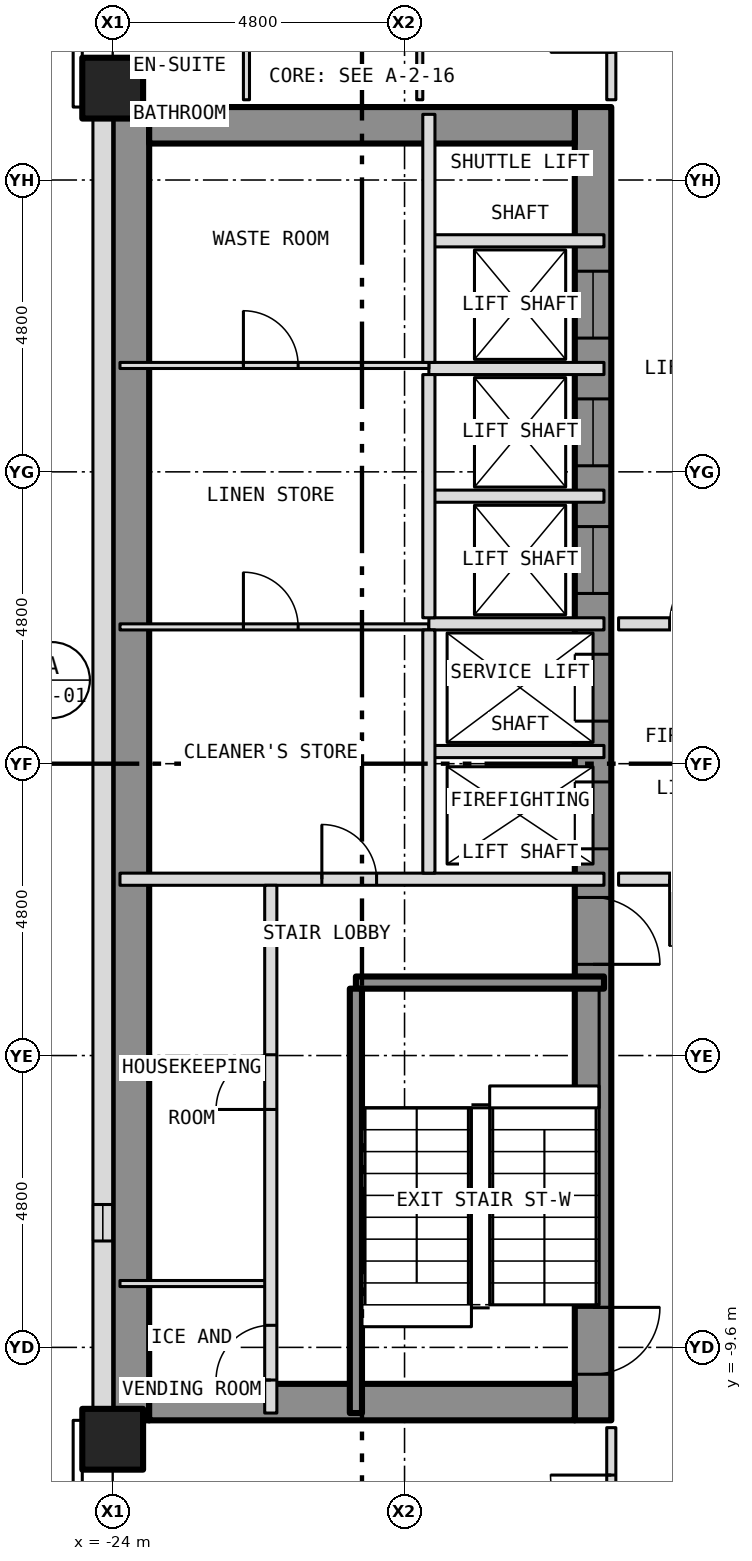
"""IFC4 building model, lengths in metres.
Left out: names, types, materials, properties, quantities, classifications, styles, units other than length and angle.
Written with IfcOpenShell. Run it as: python <this file> out.ifc"""

import sys

from ifc_helpers import new_model, si_unit, direction, frame, frame_2d, origin, origin_2d, place, context, subcontext, project, spatial, rectangle, hollow_rectangle, extrude, element, fill, save


model = new_model("IFC4")
c1 = context("Model", 3, precision=1e-05, world=origin(), true_north=direction((0.0, 1.0)))
c2 = subcontext(c1, "Body", "Model", "MODEL_VIEW")
j1 = project(units=[si_unit("LENGTHUNIT", "METRE"), si_unit("PLANEANGLEUNIT", "RADIAN")], contexts=[c1])
p1 = place(None, origin())
s1 = spatial("IfcSite", under=j1, at=p1, CompositionType="ELEMENT")
p2 = place(p1, origin())
s2 = spatial("IfcBuilding", under=s1, at=p2, CompositionType="ELEMENT")
p3 = place(p2, frame((0.0, 0.0, 60.0)))
s3 = spatial("IfcBuildingStorey", under=s2, at=p3, CompositionType="ELEMENT", Elevation=60.0)
for number, where, z_axis, x_axis in (
    (1, (-24.0, -11.111, -0.15), (0.0, 0.0, 1.0), (1.0, 0.0, 0.0)),
    (2, (-24.0, 11.111, -0.15), (0.0, 0.0, 1.0), (1.0, 0.0, 0.0)),
):
    element("IfcColumn", number, at=place(p3, frame(where, z_axis=z_axis, x_axis=x_axis)), inside=s3, PredefinedType="COLUMN", context=c2, shape_type="SweptSolid", body=[
        extrude(hollow_rectangle(XDim=1.0, YDim=1.0, WallThickness=0.06, at=origin_2d()), origin(), (0.0, 0.0, 1.0), 3.5),
    ])
p4 = place(p3, frame((-16.1, -10.8, 0.0), z_axis=(0.0, 0.0, 1.0), x_axis=(0.0, 1.0, 0.0)))
e3 = element("IfcWall", 3, at=p4, inside=s3, PredefinedType="SHEAR", context=c2, shape_type="SweptSolid", body=[
    extrude(rectangle(XDim=21.6, YDim=0.6, at=frame_2d((10.8, 0.0))), origin(), (0.0, 0.0, 1.0), 3.25),
])
p5 = place(p4, frame((9.4, 0.0, 0.0)))
e4 = element("IfcOpeningElement", 4, at=p5, cuts=e3, PredefinedType="OPENING", context=c2, shape_type="SweptSolid", body=[
    extrude(rectangle(XDim=1.1, YDim=2.1, at=frame_2d((0.55, 1.05))), frame((0.0, 0.312, 0.0), z_axis=(0.0, -1.0, 0.0), x_axis=(1.0, 0.0, 0.0)), (0.0, 0.0, 1.0), 0.624),
])
p6 = place(p4, frame((11.5, 0.0, 0.0)))
e5 = element("IfcOpeningElement", 5, at=p6, cuts=e3, PredefinedType="OPENING", context=c2, shape_type="SweptSolid", body=[
    extrude(rectangle(XDim=1.1, YDim=2.1, at=frame_2d((0.55, 1.05))), frame((0.0, 0.312, 0.0), z_axis=(0.0, -1.0, 0.0), x_axis=(1.0, 0.0, 0.0)), (0.0, 0.0, 1.0), 0.624),
])
p7 = place(p4, frame((13.6, 0.0, 0.0)))
e6 = element("IfcOpeningElement", 6, at=p7, cuts=e3, PredefinedType="OPENING", context=c2, shape_type="SweptSolid", body=[
    extrude(rectangle(XDim=1.1, YDim=2.1, at=frame_2d((0.55, 1.05))), frame((0.0, 0.312, 0.0), z_axis=(0.0, -1.0, 0.0), x_axis=(1.0, 0.0, 0.0)), (0.0, 0.0, 1.0), 0.624),
])
p8 = place(p4, frame((15.7, 0.0, 0.0)))
e7 = element("IfcOpeningElement", 7, at=p8, cuts=e3, PredefinedType="OPENING", context=c2, shape_type="SweptSolid", body=[
    extrude(rectangle(XDim=1.1, YDim=2.1, at=frame_2d((0.55, 1.05))), frame((0.0, 0.312, 0.0), z_axis=(0.0, -1.0, 0.0), x_axis=(1.0, 0.0, 0.0)), (0.0, 0.0, 1.0), 0.624),
])
p9 = place(p4, frame((17.8, 0.0, 0.0)))
e8 = element("IfcOpeningElement", 8, at=p9, cuts=e3, PredefinedType="OPENING", context=c2, shape_type="SweptSolid", body=[
    extrude(rectangle(XDim=1.1, YDim=2.1, at=frame_2d((0.55, 1.05))), frame((0.0, 0.312, 0.0), z_axis=(0.0, -1.0, 0.0), x_axis=(1.0, 0.0, 0.0)), (0.0, 0.0, 1.0), 0.624),
])
p10 = place(p4, frame((0.758, 0.0, 0.0)))
e9 = element("IfcOpeningElement", 9, at=p10, cuts=e3, PredefinedType="OPENING", context=c2, shape_type="SweptSolid", body=[
    extrude(rectangle(XDim=1.1, YDim=2.1, at=frame_2d((0.55, 1.05))), frame((0.0, 0.312, 0.0), z_axis=(0.0, -1.0, 0.0), x_axis=(1.0, 0.0, 0.0)), (0.0, 0.0, 1.0), 0.624),
])
p11 = place(p4, frame((7.5, 0.0, 0.0)))
e10 = element("IfcOpeningElement", 10, at=p11, cuts=e3, PredefinedType="OPENING", context=c2, shape_type="SweptSolid", body=[
    extrude(rectangle(XDim=1.1, YDim=2.1, at=frame_2d((0.55, 1.05))), frame((0.0, 0.312, 0.0), z_axis=(0.0, -1.0, 0.0), x_axis=(1.0, 0.0, 0.0)), (0.0, 0.0, 1.0), 0.624),
])
p12 = place(p3, frame((-23.7, -10.8, 0.0), z_axis=(0.0, 0.0, 1.0), x_axis=(0.0, 1.0, 0.0)))
e11 = element("IfcWall", 11, at=p12, inside=s3, PredefinedType="SHEAR", context=c2, shape_type="SweptSolid", body=[
    extrude(rectangle(XDim=21.6, YDim=0.6, at=frame_2d((10.8, 0.0))), origin(), (0.0, 0.0, 1.0), 3.25),
])
for number, where, z_axis, x_axis in (
    (12, (-23.4, 10.5, 0.0), (0.0, 0.0, 1.0), (1.0, 0.0, 0.0)),
    (13, (-23.4, -10.5, 0.0), (0.0, 0.0, 1.0), (1.0, 0.0, 0.0)),
):
    element("IfcWall", number, at=place(p3, frame(where, z_axis=z_axis, x_axis=x_axis)), inside=s3, PredefinedType="SHEAR", context=c2, shape_type="SweptSolid", body=[
        extrude(rectangle(XDim=7.0, YDim=0.6, at=frame_2d((3.5, 0.0))), origin(), (0.0, 0.0, 1.0), 3.25),
    ])
p13 = place(p3, frame((-24.163, 10.8, 0.0), z_axis=(0.0, 0.0, 1.0), x_axis=(0.0, -1.0, 0.0)))
e14 = element("IfcWall", 14, at=p13, inside=s3, PredefinedType="SOLIDWALL", context=c2, shape_type="SweptSolid", body=[
    extrude(rectangle(XDim=21.6, YDim=0.325, at=frame_2d((10.8, 0.0))), origin(), (0.0, 0.0, 1.0), 3.5),
])
p14 = place(p13, frame((18.05, 0.0, 1.0)))
e15 = element("IfcOpeningElement", 15, at=p14, cuts=e14, PredefinedType="OPENING", context=c2, shape_type="SweptSolid", body=[
    extrude(rectangle(XDim=0.6, YDim=1.5, at=frame_2d((0.3, 0.75))), frame((0.0, 0.175, 0.0), z_axis=(0.0, -1.0, 0.0), x_axis=(1.0, 0.0, 0.0)), (0.0, 0.0, 1.0), 0.349),
])
p15 = place(p3, frame((-23.88, -8.55, 0.0), z_axis=(0.0, 0.0, 1.0), x_axis=(1.0, 0.0, 0.0)))
e16 = element("IfcWall", 16, at=p15, inside=s3, PredefinedType="PARTITIONING", context=c2, shape_type="SweptSolid", body=[
    extrude(rectangle(XDim=2.48, YDim=0.1, at=frame_2d((1.24, 0.0))), origin(), (0.0, 0.0, 1.0), 3.25),
])
p16 = place(p3, frame((-20.0, -3.6, 0.0), z_axis=(0.0, 0.0, 1.0), x_axis=(1.0, 0.0, 0.0)))
e17 = element("IfcWall", 17, at=p16, inside=s3, PredefinedType="SHEAR", context=c2, shape_type="SweptSolid", body=[
    extrude(rectangle(XDim=4.08, YDim=0.2, at=frame_2d((2.04, 0.0))), origin(), (0.0, 0.0, 1.0), 3.25),
])
p17 = place(p3, frame((-23.88, -1.9, 0.0), z_axis=(0.0, 0.0, 1.0), x_axis=(1.0, 0.0, 0.0)))
e18 = element("IfcWall", 18, at=p17, inside=s3, PredefinedType="PARTITIONING", context=c2, shape_type="SweptSolid", body=[
    extrude(rectangle(XDim=7.96, YDim=0.2, at=frame_2d((3.98, 0.0))), origin(), (0.0, 0.0, 1.0), 3.25),
])
p18 = place(p17, frame((3.32, 0.0, 0.0)))
e19 = element("IfcOpeningElement", 19, at=p18, cuts=e18, PredefinedType="OPENING", context=c2, shape_type="SweptSolid", body=[
    extrude(rectangle(XDim=0.9, YDim=2.1, at=frame_2d((0.45, 1.05))), frame((0.0, 0.112, 0.0), z_axis=(0.0, -1.0, 0.0), x_axis=(1.0, 0.0, 0.0)), (0.0, 0.0, 1.0), 0.224),
])
p19 = place(p3, frame((-15.68, -1.9, 0.0), z_axis=(0.0, 0.0, 1.0), x_axis=(1.0, 0.0, 0.0)))
e20 = element("IfcWall", 20, at=p19, inside=s3, PredefinedType="PARTITIONING", context=c2, shape_type="SweptSolid", body=[
    extrude(rectangle(XDim=3.28, YDim=0.2, at=frame_2d((1.64, 0.0))), origin(), (0.0, 0.0, 1.0), 3.35),
])
p20 = place(p19, frame((0.84, 0.0, 0.0)))
e21 = element("IfcOpeningElement", 21, at=p20, cuts=e20, PredefinedType="OPENING", context=c2, shape_type="SweptSolid", body=[
    extrude(rectangle(XDim=1.1, YDim=2.1, at=frame_2d((0.55, 1.05))), frame((0.0, 0.112, 0.0), z_axis=(0.0, -1.0, 0.0), x_axis=(1.0, 0.0, 0.0)), (0.0, 0.0, 1.0), 0.224),
])
p21 = place(p3, frame((-18.8, 0.2, 0.0), z_axis=(0.0, 0.0, 1.0), x_axis=(1.0, 0.0, 0.0)))
e22 = element("IfcWall", 22, at=p21, inside=s3, PredefinedType="PARTITIONING", context=c2, shape_type="SweptSolid", body=[
    extrude(rectangle(XDim=2.88, YDim=0.2, at=frame_2d((1.44, 0.0))), origin(), (0.0, 0.0, 1.0), 3.25),
])
p22 = place(p3, frame((-23.88, 2.25, 0.0), z_axis=(0.0, 0.0, 1.0), x_axis=(1.0, 0.0, 0.0)))
e23 = element("IfcWall", 23, at=p22, inside=s3, PredefinedType="PARTITIONING", context=c2, shape_type="SweptSolid", body=[
    extrude(rectangle(XDim=5.08, YDim=0.1, at=frame_2d((2.54, 0.0))), origin(), (0.0, 0.0, 1.0), 3.25),
])
p23 = place(p22, frame((2.03, 0.0, 0.0)))
e24 = element("IfcOpeningElement", 24, at=p23, cuts=e23, PredefinedType="OPENING", context=c2, shape_type="SweptSolid", body=[
    extrude(rectangle(XDim=0.9, YDim=2.1, at=frame_2d((0.45, 1.05))), frame((0.0, 0.062, 0.0), z_axis=(0.0, -1.0, 0.0), x_axis=(1.0, 0.0, 0.0)), (0.0, 0.0, 1.0), 0.124),
])
p24 = place(p3, frame((-18.8, 2.3, 0.0), z_axis=(0.0, 0.0, 1.0), x_axis=(1.0, 0.0, 0.0)))
e25 = element("IfcWall", 25, at=p24, inside=s3, PredefinedType="PARTITIONING", context=c2, shape_type="SweptSolid", body=[
    extrude(rectangle(XDim=2.88, YDim=0.2, at=frame_2d((1.44, 0.0))), origin(), (0.0, 0.0, 1.0), 3.25),
])
p25 = place(p3, frame((-15.68, 2.3, 0.0), z_axis=(0.0, 0.0, 1.0), x_axis=(1.0, 0.0, 0.0)))
e26 = element("IfcWall", 26, at=p25, inside=s3, PredefinedType="PARTITIONING", context=c2, shape_type="SweptSolid", body=[
    extrude(rectangle(XDim=3.28, YDim=0.2, at=frame_2d((1.64, 0.0))), origin(), (0.0, 0.0, 1.0), 3.35),
])
p26 = place(p25, frame((0.84, 0.0, 0.0)))
e27 = element("IfcOpeningElement", 27, at=p26, cuts=e26, PredefinedType="OPENING", context=c2, shape_type="SweptSolid", body=[
    extrude(rectangle(XDim=1.1, YDim=2.1, at=frame_2d((0.55, 1.05))), frame((0.0, 0.112, 0.0), z_axis=(0.0, -1.0, 0.0), x_axis=(1.0, 0.0, 0.0)), (0.0, 0.0, 1.0), 0.224),
])
for number, where, z_axis, x_axis in (
    (28, (-18.8, 4.4, 0.0), (0.0, 0.0, 1.0), (1.0, 0.0, 0.0)),
    (29, (-18.8, 6.5, 0.0), (0.0, 0.0, 1.0), (1.0, 0.0, 0.0)),
):
    element("IfcWall", number, at=place(p3, frame(where, z_axis=z_axis, x_axis=x_axis)), inside=s3, PredefinedType="PARTITIONING", context=c2, shape_type="SweptSolid", body=[
        extrude(rectangle(XDim=2.88, YDim=0.2, at=frame_2d((1.44, 0.0))), origin(), (0.0, 0.0, 1.0), 3.25),
    ])
p27 = place(p3, frame((-23.88, 6.55, 0.0), z_axis=(0.0, 0.0, 1.0), x_axis=(1.0, 0.0, 0.0)))
e30 = element("IfcWall", 30, at=p27, inside=s3, PredefinedType="PARTITIONING", context=c2, shape_type="SweptSolid", body=[
    extrude(rectangle(XDim=5.08, YDim=0.1, at=frame_2d((2.54, 0.0))), origin(), (0.0, 0.0, 1.0), 3.25),
])
p28 = place(p27, frame((2.03, 0.0, 0.0)))
e31 = element("IfcOpeningElement", 31, at=p28, cuts=e30, PredefinedType="OPENING", context=c2, shape_type="SweptSolid", body=[
    extrude(rectangle(XDim=0.9, YDim=2.1, at=frame_2d((0.45, 1.05))), frame((0.0, 0.062, 0.0), z_axis=(0.0, -1.0, 0.0), x_axis=(1.0, 0.0, 0.0)), (0.0, 0.0, 1.0), 0.124),
])
p29 = place(p3, frame((-18.8, 8.6, 0.0), z_axis=(0.0, 0.0, 1.0), x_axis=(1.0, 0.0, 0.0)))
e32 = element("IfcWall", 32, at=p29, inside=s3, PredefinedType="PARTITIONING", context=c2, shape_type="SweptSolid", body=[
    extrude(rectangle(XDim=2.88, YDim=0.2, at=frame_2d((1.44, 0.0))), origin(), (0.0, 0.0, 1.0), 3.25),
])
p30 = place(p3, frame((-21.8, 10.92, 0.0), z_axis=(0.0, 0.0, 1.0), x_axis=(0.0, 1.0, 0.0)))
e33 = element("IfcWall", 33, at=p30, inside=s3, PredefinedType="PARTITIONING", context=c2, shape_type="SweptSolid", body=[
    extrude(rectangle(XDim=3.03, YDim=0.1, at=frame_2d((1.515, 0.0))), origin(), (0.0, 0.0, 1.0), 3.35),
])
p31 = place(p30, frame((1.67, 0.0, 0.0)))
e34 = element("IfcOpeningElement", 34, at=p31, cuts=e33, PredefinedType="OPENING", context=c2, shape_type="SweptSolid", body=[
    extrude(rectangle(XDim=0.9, YDim=2.1, at=frame_2d((0.45, 1.05))), frame((0.0, 0.062, 0.0), z_axis=(0.0, -1.0, 0.0), x_axis=(1.0, 0.0, 0.0)), (0.0, 0.0, 1.0), 0.124),
])
p32 = place(p3, frame((-21.4, -10.68, 0.0), z_axis=(0.0, 0.0, 1.0), x_axis=(0.0, 1.0, 0.0)))
e35 = element("IfcWall", 35, at=p32, inside=s3, PredefinedType="PARTITIONING", context=c2, shape_type="SweptSolid", body=[
    extrude(rectangle(XDim=8.68, YDim=0.2, at=frame_2d((4.34, 0.0))), origin(), (0.0, 0.0, 1.0), 3.25),
])
p33 = place(p32, frame((0.543, 0.0, 0.0)))
e36 = element("IfcOpeningElement", 36, at=p33, cuts=e35, PredefinedType="OPENING", context=c2, shape_type="SweptSolid", body=[
    extrude(rectangle(XDim=0.9, YDim=2.1, at=frame_2d((0.45, 1.05))), frame((0.0, 0.112, 0.0), z_axis=(0.0, -1.0, 0.0), x_axis=(1.0, 0.0, 0.0)), (0.0, 0.0, 1.0), 0.224),
])
p34 = place(p32, frame((4.993, 0.0, 0.0)))
e37 = element("IfcOpeningElement", 37, at=p34, cuts=e35, PredefinedType="OPENING", context=c2, shape_type="SweptSolid", body=[
    extrude(rectangle(XDim=0.9, YDim=2.1, at=frame_2d((0.45, 1.05))), frame((0.0, 0.112, 0.0), z_axis=(0.0, -1.0, 0.0), x_axis=(1.0, 0.0, 0.0)), (0.0, 0.0, 1.0), 0.224),
])
p35 = place(p3, frame((-20.0, -10.68, 0.0), z_axis=(0.0, 0.0, 1.0), x_axis=(0.0, 1.0, 0.0)))
e38 = element("IfcWall", 38, at=p35, inside=s3, PredefinedType="SHEAR", context=c2, shape_type="SweptSolid", body=[
    extrude(rectangle(XDim=6.98, YDim=0.2, at=frame_2d((3.49, 0.0))), origin(), (0.0, 0.0, 1.0), 3.25),
])
p36 = place(p3, frame((-18.95, 10.92, 0.0), z_axis=(0.0, 0.0, 1.0), x_axis=(0.0, 1.0, 0.0)))
e39 = element("IfcWall", 39, at=p36, inside=s3, PredefinedType="PARTITIONING", context=c2, shape_type="SweptSolid", body=[
    extrude(rectangle(XDim=13.61, YDim=0.1, at=frame_2d((6.805, 0.0))), origin(), (0.0, 0.0, 1.0), 3.35),
])
p37 = place(p36, frame((6.03, 0.0, 0.0)))
e40 = element("IfcOpeningElement", 40, at=p37, cuts=e39, PredefinedType="OPENING", context=c2, shape_type="SweptSolid", body=[
    extrude(rectangle(XDim=0.9, YDim=2.1, at=frame_2d((0.45, 1.05))), frame((0.0, 0.062, 0.0), z_axis=(0.0, -1.0, 0.0), x_axis=(1.0, 0.0, 0.0)), (0.0, 0.0, 1.0), 0.124),
])
for number, where, z_axis, x_axis in (
    (41, (-18.8, -1.8, 0.0), (0.0, 0.0, 1.0), (0.0, 1.0, 0.0)),
    (42, (-18.8, 2.4, 0.0), (0.0, 0.0, 1.0), (0.0, 1.0, 0.0)),
):
    element("IfcWall", number, at=place(p3, frame(where, z_axis=z_axis, x_axis=x_axis)), inside=s3, PredefinedType="PARTITIONING", context=c2, shape_type="SweptSolid", body=[
        extrude(rectangle(XDim=4.0, YDim=0.2, at=frame_2d((2.0, 0.0))), origin(), (0.0, 0.0, 1.0), 3.25),
    ])
p38 = place(p3, frame((-18.8, 6.6, 0.0), z_axis=(0.0, 0.0, 1.0), x_axis=(0.0, 1.0, 0.0)))
e43 = element("IfcWall", 43, at=p38, inside=s3, PredefinedType="PARTITIONING", context=c2, shape_type="SweptSolid", body=[
    extrude(rectangle(XDim=4.08, YDim=0.2, at=frame_2d((2.04, 0.0))), origin(), (0.0, 0.0, 1.0), 3.25),
])
p39 = place(p3, frame((-15.8, -15.725, 0.0), z_axis=(0.0, 0.0, 1.0), x_axis=(0.0, 1.0, 0.0)))
e44 = element("IfcWall", 44, at=p39, inside=s3, PredefinedType="PARTITIONING", context=c2, shape_type="SweptSolid", body=[
    extrude(rectangle(XDim=4.805, YDim=0.15, at=frame_2d((2.403, 0.0))), origin(), (0.0, 0.0, 1.0), 3.35),
])
p40 = place(p39, frame((3.025, 0.0, 0.0)))
e45 = element("IfcOpeningElement", 45, at=p40, cuts=e44, PredefinedType="OPENING", context=c2, shape_type="SweptSolid", body=[
    extrude(rectangle(XDim=1.0, YDim=2.1, at=frame_2d((0.5, 1.05))), frame((0.0, 0.087, 0.0), z_axis=(0.0, -1.0, 0.0), x_axis=(1.0, 0.0, 0.0)), (0.0, 0.0, 1.0), 0.174),
])
p41 = place(p3, frame((-15.8, 10.92, 0.0), z_axis=(0.0, 0.0, 1.0), x_axis=(0.0, 1.0, 0.0)))
e46 = element("IfcWall", 46, at=p41, inside=s3, PredefinedType="PARTITIONING", context=c2, shape_type="SweptSolid", body=[
    extrude(rectangle(XDim=4.805, YDim=0.15, at=frame_2d((2.403, 0.0))), origin(), (0.0, 0.0, 1.0), 3.35),
])
p42 = place(p41, frame((0.78, 0.0, 0.0)))
e47 = element("IfcOpeningElement", 47, at=p42, cuts=e46, PredefinedType="OPENING", context=c2, shape_type="SweptSolid", body=[
    extrude(rectangle(XDim=1.0, YDim=2.1, at=frame_2d((0.5, 1.05))), frame((0.0, 0.087, 0.0), z_axis=(0.0, -1.0, 0.0), x_axis=(1.0, 0.0, 0.0)), (0.0, 0.0, 1.0), 0.174),
])
p43 = place(p14, origin())
e48 = element("IfcWindow", 48, at=p43, inside=s3, PartitioningType="SINGLE_PANEL", PredefinedType="WINDOW", context=c2, shape_type="SweptSolid", body=[
    extrude(rectangle(XDim=0.6, YDim=1.5, at=frame_2d((0.3, 0.75))), frame((0.0, -0.073, 0.0), z_axis=(0.0, -1.0, 0.0), x_axis=(1.0, 0.0, 0.0)), (0.0, 0.0, 1.0), 0.06),
])
fill(e15, e48)
p44 = place(p5, origin())
e49 = element("IfcDoor", 49, at=p44, inside=s3, OperationType="SLIDING_TO_LEFT", PredefinedType="DOOR", context=c2, shape_type="SweptSolid", body=[
    extrude(rectangle(XDim=1.1, YDim=2.1, at=frame_2d((0.55, 1.05))), frame((0.0, 0.025, 0.0), z_axis=(0.0, -1.0, 0.0), x_axis=(1.0, 0.0, 0.0)), (0.0, 0.0, 1.0), 0.05),
])
fill(e4, e49)
p45 = place(p6, origin())
e50 = element("IfcDoor", 50, at=p45, inside=s3, OperationType="SLIDING_TO_LEFT", PredefinedType="DOOR", context=c2, shape_type="SweptSolid", body=[
    extrude(rectangle(XDim=1.1, YDim=2.1, at=frame_2d((0.55, 1.05))), frame((0.0, 0.025, 0.0), z_axis=(0.0, -1.0, 0.0), x_axis=(1.0, 0.0, 0.0)), (0.0, 0.0, 1.0), 0.05),
])
fill(e5, e50)
p46 = place(p7, origin())
e51 = element("IfcDoor", 51, at=p46, inside=s3, OperationType="SLIDING_TO_LEFT", PredefinedType="DOOR", context=c2, shape_type="SweptSolid", body=[
    extrude(rectangle(XDim=1.1, YDim=2.1, at=frame_2d((0.55, 1.05))), frame((0.0, 0.025, 0.0), z_axis=(0.0, -1.0, 0.0), x_axis=(1.0, 0.0, 0.0)), (0.0, 0.0, 1.0), 0.05),
])
fill(e6, e51)
p47 = place(p8, origin())
e52 = element("IfcDoor", 52, at=p47, inside=s3, OperationType="SLIDING_TO_LEFT", PredefinedType="DOOR", context=c2, shape_type="SweptSolid", body=[
    extrude(rectangle(XDim=1.1, YDim=2.1, at=frame_2d((0.55, 1.05))), frame((0.0, 0.025, 0.0), z_axis=(0.0, -1.0, 0.0), x_axis=(1.0, 0.0, 0.0)), (0.0, 0.0, 1.0), 0.05),
])
fill(e7, e52)
p48 = place(p9, origin())
e53 = element("IfcDoor", 53, at=p48, inside=s3, OperationType="SLIDING_TO_LEFT", PredefinedType="DOOR", context=c2, shape_type="SweptSolid", body=[
    extrude(rectangle(XDim=1.1, YDim=2.1, at=frame_2d((0.55, 1.05))), frame((0.0, 0.025, 0.0), z_axis=(0.0, -1.0, 0.0), x_axis=(1.0, 0.0, 0.0)), (0.0, 0.0, 1.0), 0.05),
])
fill(e8, e53)
p49 = place(p10, origin())
e54 = element("IfcDoor", 54, at=p49, inside=s3, OperationType="SINGLE_SWING_RIGHT", PredefinedType="DOOR", context=c2, shape_type="SweptSolid", body=[
    extrude(rectangle(XDim=1.1, YDim=2.1, at=frame_2d((0.55, 1.05))), frame((0.0, 0.025, 0.0), z_axis=(0.0, -1.0, 0.0), x_axis=(1.0, 0.0, 0.0)), (0.0, 0.0, 1.0), 0.05),
])
fill(e9, e54)
p50 = place(p11, origin())
e55 = element("IfcDoor", 55, at=p50, inside=s3, OperationType="SINGLE_SWING_LEFT", PredefinedType="DOOR", context=c2, shape_type="SweptSolid", body=[
    extrude(rectangle(XDim=1.1, YDim=2.1, at=frame_2d((0.55, 1.05))), frame((0.0, 0.025, 0.0), z_axis=(0.0, -1.0, 0.0), x_axis=(1.0, 0.0, 0.0)), (0.0, 0.0, 1.0), 0.05),
])
fill(e10, e55)
p51 = place(p33, origin())
e56 = element("IfcDoor", 56, at=p51, inside=s3, OperationType="SINGLE_SWING_LEFT", PredefinedType="DOOR", context=c2, shape_type="SweptSolid", body=[
    extrude(rectangle(XDim=0.9, YDim=2.1, at=frame_2d((0.45, 1.05))), frame((0.0, 0.025, 0.0), z_axis=(0.0, -1.0, 0.0), x_axis=(1.0, 0.0, 0.0)), (0.0, 0.0, 1.0), 0.05),
])
fill(e36, e56)
p52 = place(p34, origin())
e57 = element("IfcDoor", 57, at=p52, inside=s3, OperationType="SINGLE_SWING_LEFT", PredefinedType="DOOR", context=c2, shape_type="SweptSolid", body=[
    extrude(rectangle(XDim=0.9, YDim=2.1, at=frame_2d((0.45, 1.05))), frame((0.0, 0.025, 0.0), z_axis=(0.0, -1.0, 0.0), x_axis=(1.0, 0.0, 0.0)), (0.0, 0.0, 1.0), 0.05),
])
fill(e37, e57)
p53 = place(p18, origin())
e58 = element("IfcDoor", 58, at=p53, inside=s3, OperationType="SINGLE_SWING_LEFT", PredefinedType="DOOR", context=c2, shape_type="SweptSolid", body=[
    extrude(rectangle(XDim=0.9, YDim=2.1, at=frame_2d((0.45, 1.05))), frame((0.0, 0.025, 0.0), z_axis=(0.0, -1.0, 0.0), x_axis=(1.0, 0.0, 0.0)), (0.0, 0.0, 1.0), 0.05),
])
fill(e19, e58)
p54 = place(p23, origin())
e59 = element("IfcDoor", 59, at=p54, inside=s3, OperationType="SINGLE_SWING_LEFT", PredefinedType="DOOR", context=c2, shape_type="SweptSolid", body=[
    extrude(rectangle(XDim=0.9, YDim=2.1, at=frame_2d((0.45, 1.05))), frame((0.0, 0.025, 0.0), z_axis=(0.0, -1.0, 0.0), x_axis=(1.0, 0.0, 0.0)), (0.0, 0.0, 1.0), 0.05),
])
fill(e24, e59)
p55 = place(p28, origin())
e60 = element("IfcDoor", 60, at=p55, inside=s3, OperationType="SINGLE_SWING_LEFT", PredefinedType="DOOR", context=c2, shape_type="SweptSolid", body=[
    extrude(rectangle(XDim=0.9, YDim=2.1, at=frame_2d((0.45, 1.05))), frame((0.0, 0.025, 0.0), z_axis=(0.0, -1.0, 0.0), x_axis=(1.0, 0.0, 0.0)), (0.0, 0.0, 1.0), 0.05),
])
fill(e31, e60)
p56 = place(p26, origin())
e61 = element("IfcDoor", 61, at=p56, inside=s3, OperationType="SINGLE_SWING_RIGHT", PredefinedType="DOOR", context=c2, shape_type="SweptSolid", body=[
    extrude(rectangle(XDim=1.1, YDim=2.1, at=frame_2d((0.55, 1.05))), frame((0.0, 0.025, 0.0), z_axis=(0.0, -1.0, 0.0), x_axis=(1.0, 0.0, 0.0)), (0.0, 0.0, 1.0), 0.05),
])
fill(e27, e61)
p57 = place(p20, origin())
e62 = element("IfcDoor", 62, at=p57, inside=s3, OperationType="SINGLE_SWING_LEFT", PredefinedType="DOOR", context=c2, shape_type="SweptSolid", body=[
    extrude(rectangle(XDim=1.1, YDim=2.1, at=frame_2d((0.55, 1.05))), frame((0.0, 0.025, 0.0), z_axis=(0.0, -1.0, 0.0), x_axis=(1.0, 0.0, 0.0)), (0.0, 0.0, 1.0), 0.05),
])
fill(e21, e62)
p58 = place(p40, origin())
e63 = element("IfcDoor", 63, at=p58, inside=s3, OperationType="SINGLE_SWING_RIGHT", PredefinedType="DOOR", context=c2, shape_type="SweptSolid", body=[
    extrude(rectangle(XDim=1.0, YDim=2.1, at=frame_2d((0.5, 1.05))), frame((0.0, 0.025, 0.0), z_axis=(0.0, -1.0, 0.0), x_axis=(1.0, 0.0, 0.0)), (0.0, 0.0, 1.0), 0.05),
])
fill(e45, e63)
save(model, sys.argv[1])
